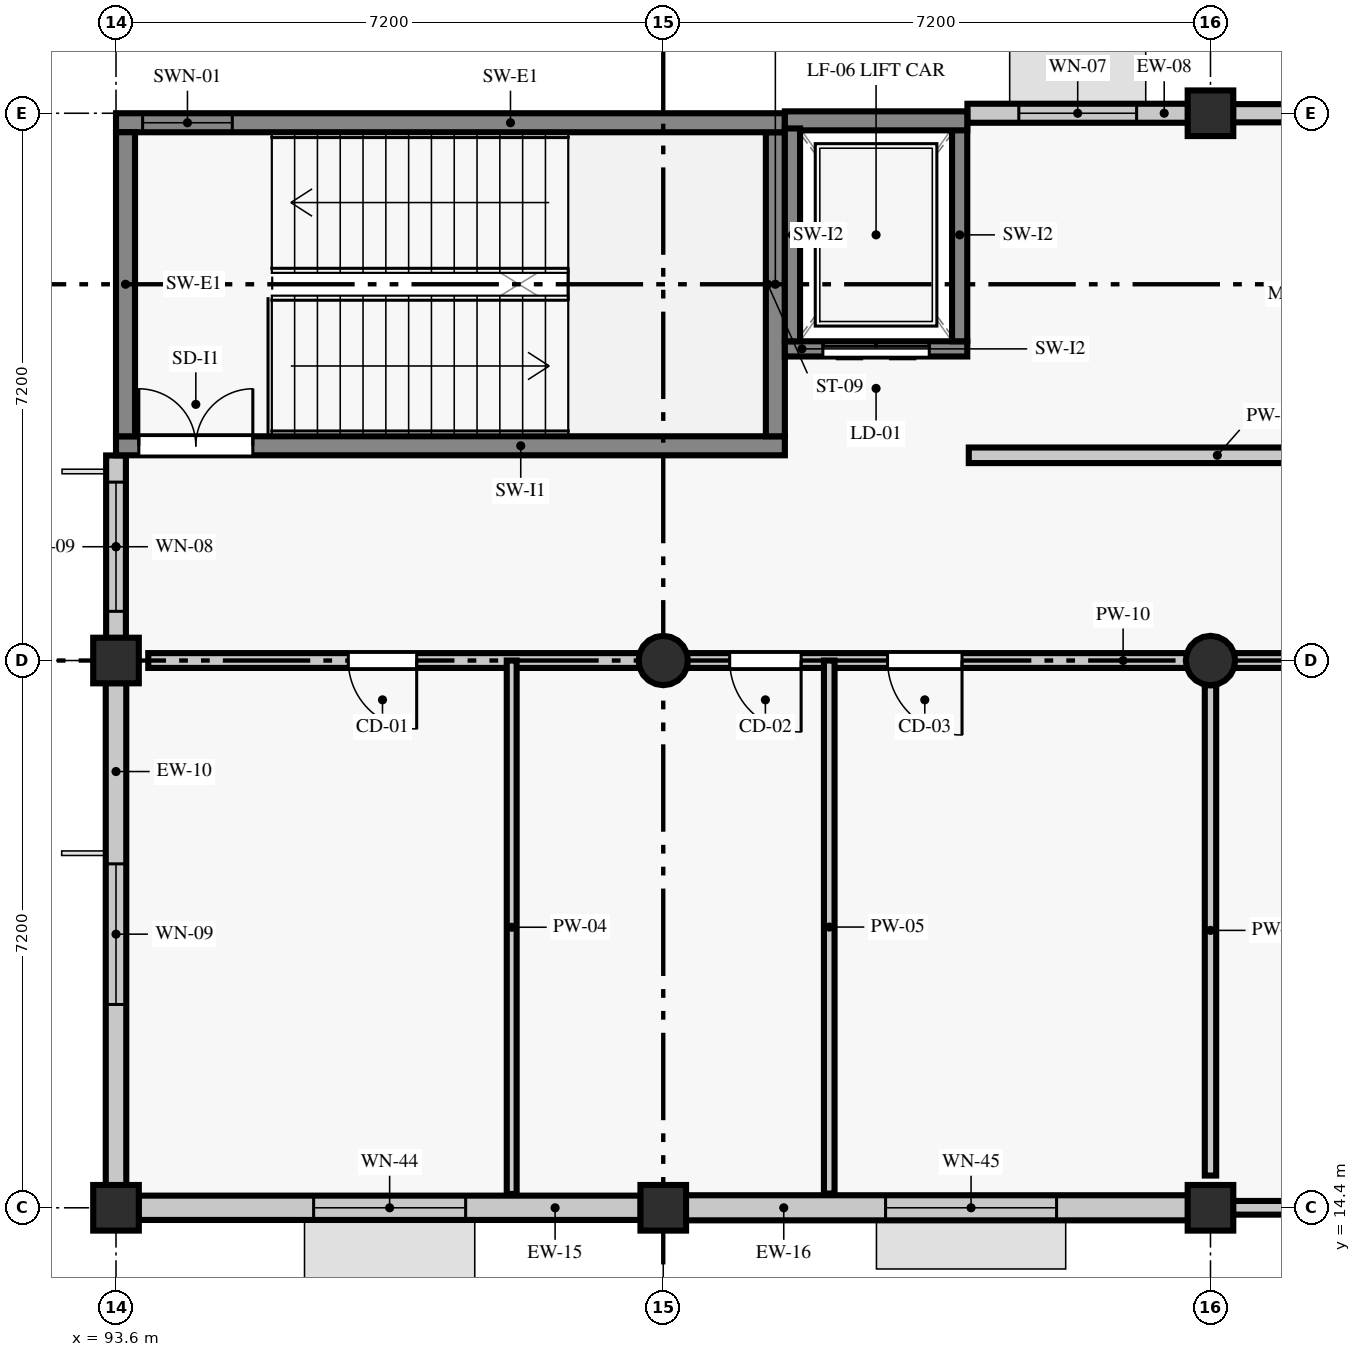
"""IFC4 building model, lengths in metres.
Left out: names, types, materials, properties, quantities, classifications, styles, units other than length and angle.
Written with IfcOpenShell. Run it as: python <this file> out.ifc"""

import sys

from ifc_helpers import new_model, si_unit, direction, frame, frame_2d, origin, origin_2d, place, context, subcontext, project, spatial, rectangle, circle, extrude, element, fill, save


model = new_model("IFC4")
c1 = context("Model", 3, precision=1e-05, world=origin(), true_north=direction((0.0, 1.0)))
c2 = subcontext(c1, "Body", "Model", "MODEL_VIEW")
j1 = project(units=[si_unit("LENGTHUNIT", "METRE"), si_unit("PLANEANGLEUNIT", "RADIAN")], contexts=[c1])
p1 = place(None, origin())
s1 = spatial("IfcSite", under=j1, at=p1, CompositionType="ELEMENT")
p2 = place(p1, origin())
s2 = spatial("IfcBuilding", under=s1, at=p2, CompositionType="ELEMENT")
p3 = place(p2, frame((0.0, 0.0, 9.6)))
s3 = spatial("IfcBuildingStorey", under=s2, at=p3, CompositionType="ELEMENT", Elevation=9.6)
for number, where, z_axis, x_axis in (
    (1, (93.6, 14.4, 0.0), (0.0, 0.0, 1.0), (1.0, 0.0, 0.0)),
    (2, (93.6, 21.6, 0.0), (0.0, 0.0, 1.0), (1.0, 0.0, 0.0)),
    (3, (100.8, 14.4, 0.0), (0.0, 0.0, 1.0), (1.0, 0.0, 0.0)),
):
    element("IfcColumn", number, at=place(p3, frame(where, z_axis=z_axis, x_axis=x_axis)), inside=s3, PredefinedType="COLUMN", context=c2, shape_type="SweptSolid", body=[
        extrude(rectangle(XDim=0.6, YDim=0.6, at=origin_2d()), origin(), (0.0, 0.0, 1.0), 3.885),
    ])
p4 = place(p3, frame((100.8, 21.6, 0.0), z_axis=(0.0, 0.0, 1.0), x_axis=(1.0, 0.0, 0.0)))
e4 = element("IfcColumn", 4, at=p4, inside=s3, PredefinedType="COLUMN", context=c2, shape_type="SweptSolid", body=[
    extrude(circle(Radius=0.325, at=origin_2d()), origin(), (0.0, 0.0, 1.0), 3.885),
])
p5 = place(p3, frame((108.0, 14.4, 0.0), z_axis=(0.0, 0.0, 1.0), x_axis=(1.0, 0.0, 0.0)))
e5 = element("IfcColumn", 5, at=p5, inside=s3, PredefinedType="COLUMN", context=c2, shape_type="SweptSolid", body=[
    extrude(rectangle(XDim=0.6, YDim=0.6, at=origin_2d()), origin(), (0.0, 0.0, 1.0), 3.885),
])
p6 = place(p3, frame((108.0, 21.6, 0.0), z_axis=(0.0, 0.0, 1.0), x_axis=(1.0, 0.0, 0.0)))
e6 = element("IfcColumn", 6, at=p6, inside=s3, PredefinedType="COLUMN", context=c2, shape_type="SweptSolid", body=[
    extrude(circle(Radius=0.325, at=origin_2d()), origin(), (0.0, 0.0, 1.0), 3.885),
])
p7 = place(p3, frame((108.0, 28.8, 0.0), z_axis=(0.0, 0.0, 1.0), x_axis=(1.0, 0.0, 0.0)))
e7 = element("IfcColumn", 7, at=p7, inside=s3, PredefinedType="COLUMN", context=c2, shape_type="SweptSolid", body=[
    extrude(rectangle(XDim=0.6, YDim=0.6, at=origin_2d()), origin(), (0.0, 0.0, 1.0), 3.885),
])
p8 = place(p3, frame((93.896, 14.4, 0.0), z_axis=(0.0, 0.0, 1.0), x_axis=(1.0, 0.0, 0.0)))
e8 = element("IfcWall", 8, at=p8, inside=s3, PredefinedType="STANDARD", context=c2, shape_type="SweptSolid", body=[
    extrude(rectangle(XDim=6.608, YDim=0.32, at=frame_2d((3.304, 0.0))), origin(), (0.0, 0.0, 1.0), 3.235),
])
p9 = place(p8, frame((2.304, 0.0, 0.9)))
e9 = element("IfcOpeningElement", 9, at=p9, cuts=e8, PredefinedType="OPENING", context=c2, shape_type="SweptSolid", body=[
    extrude(rectangle(XDim=2.0, YDim=1.78, at=frame_2d((1.0, 0.89))), frame((0.0, 0.17, 0.0), z_axis=(0.0, -1.0, 0.0), x_axis=(1.0, 0.0, 0.0)), (0.0, 0.0, 1.0), 0.34),
])
p10 = place(p3, frame((101.096, 14.4, 0.0), z_axis=(0.0, 0.0, 1.0), x_axis=(1.0, 0.0, 0.0)))
e10 = element("IfcWall", 10, at=p10, inside=s3, PredefinedType="STANDARD", context=c2, shape_type="SweptSolid", body=[
    extrude(rectangle(XDim=6.608, YDim=0.33, at=frame_2d((3.304, 0.0))), origin(), (0.0, 0.0, 1.0), 3.235),
])
p11 = place(p10, frame((2.629, 0.0, 0.9)))
e11 = element("IfcOpeningElement", 11, at=p11, cuts=e10, PredefinedType="OPENING", context=c2, shape_type="SweptSolid", body=[
    extrude(rectangle(XDim=2.25, YDim=1.78, at=frame_2d((1.125, 0.89))), frame((0.0, 0.175, 0.0), z_axis=(0.0, -1.0, 0.0), x_axis=(1.0, 0.0, 0.0)), (0.0, 0.0, 1.0), 0.35),
])
p12 = place(p3, frame((108.296, 14.4, 0.0), z_axis=(0.0, 0.0, 1.0), x_axis=(1.0, 0.0, 0.0)))
e12 = element("IfcWall", 12, at=p12, inside=s3, PredefinedType="STANDARD", context=c2, shape_type="SweptSolid", body=[
    extrude(rectangle(XDim=6.608, YDim=0.18, at=frame_2d((3.304, 0.0))), origin(), (0.0, 0.0, 1.0), 3.235),
])
p13 = place(p12, frame((2.829, 0.0, 0.9)))
e13 = element("IfcOpeningElement", 13, at=p13, cuts=e12, PredefinedType="OPENING", context=c2, shape_type="SweptSolid", body=[
    extrude(rectangle(XDim=0.95, YDim=1.3, at=frame_2d((0.475, 0.65))), frame((0.0, 0.1, 0.0), z_axis=(0.0, -1.0, 0.0), x_axis=(1.0, 0.0, 0.0)), (0.0, 0.0, 1.0), 0.2),
])
p14 = place(p3, frame((113.598, 28.8, 0.0), z_axis=(0.0, 0.0, 1.0), x_axis=(-1.0, 0.0, 0.0)))
e14 = element("IfcWall", 14, at=p14, inside=s3, PredefinedType="STANDARD", context=c2, shape_type="SweptSolid", body=[
    extrude(rectangle(XDim=5.302, YDim=0.24, at=frame_2d((2.651, 0.0))), origin(), (0.0, 0.0, 1.0), 3.885),
])
p15 = place(p14, frame((1.926, 0.0, 0.9)))
e15 = element("IfcOpeningElement", 15, at=p15, cuts=e14, PredefinedType="OPENING", context=c2, shape_type="SweptSolid", body=[
    extrude(rectangle(XDim=1.45, YDim=1.3, at=frame_2d((0.725, 0.65))), frame((0.0, 0.13, 0.0), z_axis=(0.0, -1.0, 0.0), x_axis=(1.0, 0.0, 0.0)), (0.0, 0.0, 1.0), 0.26),
])
p16 = place(p3, frame((107.704, 28.8, 0.0), z_axis=(0.0, 0.0, 1.0), x_axis=(-1.0, 0.0, 0.0)))
e16 = element("IfcWall", 16, at=p16, inside=s3, PredefinedType="STANDARD", context=c2, shape_type="SweptSolid", body=[
    extrude(rectangle(XDim=2.902, YDim=0.25, at=frame_2d((1.451, 0.0))), origin(), (0.0, 0.0, 1.0), 3.885),
])
p17 = place(p16, frame((0.676, 0.0, 0.9)))
e17 = element("IfcOpeningElement", 17, at=p17, cuts=e16, PredefinedType="OPENING", context=c2, shape_type="SweptSolid", body=[
    extrude(rectangle(XDim=1.55, YDim=1.3, at=frame_2d((0.775, 0.65))), frame((0.0, 0.135, 0.0), z_axis=(0.0, -1.0, 0.0), x_axis=(1.0, 0.0, 0.0)), (0.0, 0.0, 1.0), 0.27),
])
p18 = place(p3, frame((93.6, 24.298, 0.0), z_axis=(0.0, 0.0, 1.0), x_axis=(0.0, -1.0, 0.0)))
e18 = element("IfcWall", 18, at=p18, inside=s3, PredefinedType="STANDARD", context=c2, shape_type="SweptSolid", body=[
    extrude(rectangle(XDim=2.402, YDim=0.26, at=frame_2d((1.201, 0.0))), origin(), (0.0, 0.0, 1.0), 3.885),
])
p19 = place(p18, frame((0.351, 0.0, 0.9)))
e19 = element("IfcOpeningElement", 19, at=p19, cuts=e18, PredefinedType="OPENING", context=c2, shape_type="SweptSolid", body=[
    extrude(rectangle(XDim=1.7, YDim=1.3, at=frame_2d((0.85, 0.65))), frame((0.0, 0.14, 0.0), z_axis=(0.0, -1.0, 0.0), x_axis=(1.0, 0.0, 0.0)), (0.0, 0.0, 1.0), 0.28),
])
p20 = place(p3, frame((93.6, 21.304, 0.0), z_axis=(0.0, 0.0, 1.0), x_axis=(0.0, -1.0, 0.0)))
e20 = element("IfcWall", 20, at=p20, inside=s3, PredefinedType="STANDARD", context=c2, shape_type="SweptSolid", body=[
    extrude(rectangle(XDim=6.608, YDim=0.27, at=frame_2d((3.304, 0.0))), origin(), (0.0, 0.0, 1.0), 3.235),
])
p21 = place(p20, frame((2.379, 0.0, 0.9)))
e21 = element("IfcOpeningElement", 21, at=p21, cuts=e20, PredefinedType="OPENING", context=c2, shape_type="SweptSolid", body=[
    extrude(rectangle(XDim=1.85, YDim=1.3, at=frame_2d((0.925, 0.65))), frame((0.0, 0.145, 0.0), z_axis=(0.0, -1.0, 0.0), x_axis=(1.0, 0.0, 0.0)), (0.0, 0.0, 1.0), 0.29),
])
p22 = place(p3, frame((93.6, 24.425, 0.0), z_axis=(0.0, 0.0, 1.0), x_axis=(1.0, 0.0, 0.0)))
e22 = element("IfcWall", 22, at=p22, inside=s3, PredefinedType="SHEAR", context=c2, shape_type="SweptSolid", body=[
    extrude(rectangle(XDim=8.8, YDim=0.25, at=frame_2d((4.4, 0.0))), origin(), (0.0, 0.0, 1.0), 3.885),
])
p23 = place(p22, frame((0.3, 0.0, 0.0)))
e23 = element("IfcOpeningElement", 23, at=p23, cuts=e22, PredefinedType="OPENING", context=c2, shape_type="SweptSolid", body=[
    extrude(rectangle(XDim=1.5, YDim=2.15, at=frame_2d((0.75, 1.075))), frame((0.0, 0.135, 0.0), z_axis=(0.0, -1.0, 0.0), x_axis=(1.0, 0.0, 0.0)), (0.0, 0.0, 1.0), 0.27),
])
p24 = place(p3, frame((102.275, 24.55, 0.0), z_axis=(0.0, 0.0, 1.0), x_axis=(0.0, 1.0, 0.0)))
e24 = element("IfcWall", 24, at=p24, inside=s3, PredefinedType="SHEAR", context=c2, shape_type="SweptSolid", body=[
    extrude(rectangle(XDim=4.0, YDim=0.25, at=frame_2d((2.0, 0.0))), origin(), (0.0, 0.0, 1.0), 3.885),
])
p25 = place(p3, frame((102.4, 28.675, 0.0), z_axis=(0.0, 0.0, 1.0), x_axis=(-1.0, 0.0, 0.0)))
e25 = element("IfcWall", 25, at=p25, inside=s3, PredefinedType="SHEAR", context=c2, shape_type="SweptSolid", body=[
    extrude(rectangle(XDim=8.8, YDim=0.25, at=frame_2d((4.4, 0.0))), origin(), (0.0, 0.0, 1.0), 3.885),
])
p26 = place(p25, frame((7.27, 0.0, 0.92)))
e26 = element("IfcOpeningElement", 26, at=p26, cuts=e25, PredefinedType="OPENING", context=c2, shape_type="SweptSolid", body=[
    extrude(rectangle(XDim=1.18, YDim=1.48, at=frame_2d((0.59, 0.74))), frame((0.0, 0.135, 0.0), z_axis=(0.0, -1.0, 0.0), x_axis=(1.0, 0.0, 0.0)), (0.0, 0.0, 1.0), 0.27),
])
p27 = place(p3, frame((93.725, 28.55, 0.0), z_axis=(0.0, 0.0, 1.0), x_axis=(0.0, -1.0, 0.0)))
e27 = element("IfcWall", 27, at=p27, inside=s3, PredefinedType="SHEAR", context=c2, shape_type="SweptSolid", body=[
    extrude(rectangle(XDim=4.0, YDim=0.25, at=frame_2d((2.0, 0.0))), origin(), (0.0, 0.0, 1.0), 3.885),
])
p28 = place(p3, frame((102.4, 25.7, 0.0), z_axis=(0.0, 0.0, 1.0), x_axis=(1.0, 0.0, 0.0)))
e28 = element("IfcWall", 28, at=p28, inside=s3, PredefinedType="SHEAR", context=c2, shape_type="SweptSolid", body=[
    extrude(rectangle(XDim=2.4, YDim=0.2, at=frame_2d((1.2, 0.0))), origin(), (0.0, 0.0, 1.0), 3.885),
])
p29 = place(p28, frame((0.5, 0.0, 0.0)))
e29 = element("IfcOpeningElement", 29, at=p29, cuts=e28, PredefinedType="OPENING", context=c2, shape_type="SweptSolid", body=[
    extrude(rectangle(XDim=1.4, YDim=2.15, at=frame_2d((0.7, 1.075))), frame((0.0, 0.11, 0.0), z_axis=(0.0, -1.0, 0.0), x_axis=(1.0, 0.0, 0.0)), (0.0, 0.0, 1.0), 0.22),
])
p30 = place(p3, frame((104.7, 25.8, 0.0), z_axis=(0.0, 0.0, 1.0), x_axis=(0.0, 1.0, 0.0)))
e30 = element("IfcWall", 30, at=p30, inside=s3, PredefinedType="SHEAR", context=c2, shape_type="SweptSolid", body=[
    extrude(rectangle(XDim=2.8, YDim=0.2, at=frame_2d((1.4, 0.0))), origin(), (0.0, 0.0, 1.0), 3.885),
])
p31 = place(p3, frame((104.8, 28.7, 0.0), z_axis=(0.0, 0.0, 1.0), x_axis=(-1.0, 0.0, 0.0)))
e31 = element("IfcWall", 31, at=p31, inside=s3, PredefinedType="SHEAR", context=c2, shape_type="SweptSolid", body=[
    extrude(rectangle(XDim=2.4, YDim=0.25, at=frame_2d((1.2, 0.0))), origin(), (0.0, 0.0, 1.0), 3.885),
])
p32 = place(p3, frame((102.5, 28.6, 0.0), z_axis=(0.0, 0.0, 1.0), x_axis=(0.0, -1.0, 0.0)))
e32 = element("IfcWall", 32, at=p32, inside=s3, PredefinedType="SHEAR", context=c2, shape_type="SweptSolid", body=[
    extrude(rectangle(XDim=2.8, YDim=0.2, at=frame_2d((1.4, 0.0))), origin(), (0.0, 0.0, 1.0), 3.885),
])
p33 = place(p3, frame((94.024, 21.6, 0.0), z_axis=(0.0, 0.0, 1.0), x_axis=(1.0, 0.0, 0.0)))
e33 = element("IfcWall", 33, at=p33, inside=s3, PredefinedType="PARTITIONING", context=c2, shape_type="SweptSolid", body=[
    extrude(rectangle(XDim=27.951, YDim=0.195, at=frame_2d((13.976, 0.0))), origin(), (0.0, 0.0, 1.0), 3.185),
])
p34 = place(p33, frame((2.632, 0.0, 0.0)))
e34 = element("IfcOpeningElement", 34, at=p34, cuts=e33, PredefinedType="OPENING", context=c2, shape_type="SweptSolid", body=[
    extrude(rectangle(XDim=0.9, YDim=2.08, at=frame_2d((0.45, 1.04))), frame((0.0, 0.107, 0.0), z_axis=(0.0, -1.0, 0.0), x_axis=(1.0, 0.0, 0.0)), (0.0, 0.0, 1.0), 0.215),
])
p35 = place(p33, frame((7.65, 0.0, 0.0)))
e35 = element("IfcOpeningElement", 35, at=p35, cuts=e33, PredefinedType="OPENING", context=c2, shape_type="SweptSolid", body=[
    extrude(rectangle(XDim=0.94, YDim=2.08, at=frame_2d((0.47, 1.04))), frame((0.0, 0.107, 0.0), z_axis=(0.0, -1.0, 0.0), x_axis=(1.0, 0.0, 0.0)), (0.0, 0.0, 1.0), 0.215),
])
p36 = place(p33, frame((9.727, 0.0, 0.0)))
e36 = element("IfcOpeningElement", 36, at=p36, cuts=e33, PredefinedType="OPENING", context=c2, shape_type="SweptSolid", body=[
    extrude(rectangle(XDim=0.98, YDim=2.08, at=frame_2d((0.49, 1.04))), frame((0.0, 0.107, 0.0), z_axis=(0.0, -1.0, 0.0), x_axis=(1.0, 0.0, 0.0)), (0.0, 0.0, 1.0), 0.215),
])
p37 = place(p33, frame((14.946, 0.0, 0.0)))
e37 = element("IfcOpeningElement", 37, at=p37, cuts=e33, PredefinedType="OPENING", context=c2, shape_type="SweptSolid", body=[
    extrude(rectangle(XDim=0.94, YDim=2.08, at=frame_2d((0.47, 1.04))), frame((0.0, 0.107, 0.0), z_axis=(0.0, -1.0, 0.0), x_axis=(1.0, 0.0, 0.0)), (0.0, 0.0, 1.0), 0.215),
])
p38 = place(p33, frame((17.136, 0.0, 0.0)))
e38 = element("IfcOpeningElement", 38, at=p38, cuts=e33, PredefinedType="OPENING", context=c2, shape_type="SweptSolid", body=[
    extrude(rectangle(XDim=0.9, YDim=2.08, at=frame_2d((0.45, 1.04))), frame((0.0, 0.107, 0.0), z_axis=(0.0, -1.0, 0.0), x_axis=(1.0, 0.0, 0.0)), (0.0, 0.0, 1.0), 0.215),
])
p39 = place(p33, frame((19.366, 0.0, 0.0)))
e39 = element("IfcOpeningElement", 39, at=p39, cuts=e33, PredefinedType="OPENING", context=c2, shape_type="SweptSolid", body=[
    extrude(rectangle(XDim=0.9, YDim=2.13, at=frame_2d((0.45, 1.065))), frame((0.0, 0.107, 0.0), z_axis=(0.0, -1.0, 0.0), x_axis=(1.0, 0.0, 0.0)), (0.0, 0.0, 1.0), 0.215),
])
p40 = place(p33, frame((24.284, 0.0, 0.0)))
e40 = element("IfcOpeningElement", 40, at=p40, cuts=e33, PredefinedType="OPENING", context=c2, shape_type="SweptSolid", body=[
    extrude(rectangle(XDim=0.9, YDim=2.13, at=frame_2d((0.45, 1.065))), frame((0.0, 0.107, 0.0), z_axis=(0.0, -1.0, 0.0), x_axis=(1.0, 0.0, 0.0)), (0.0, 0.0, 1.0), 0.215),
])
p41 = place(p3, frame((98.806, 14.582, 0.0), z_axis=(0.0, 0.0, 1.0), x_axis=(0.0, 1.0, 0.0)))
e41 = element("IfcWall", 41, at=p41, inside=s3, PredefinedType="PARTITIONING", context=c2, shape_type="SweptSolid", body=[
    extrude(rectangle(XDim=7.018, YDim=0.13, at=frame_2d((3.509, 0.0))), origin(), (0.0, 0.0, 1.0), 3.185),
])
p42 = place(p3, frame((102.984, 14.587, 0.0), z_axis=(0.0, 0.0, 1.0), x_axis=(0.0, 1.0, 0.0)))
e42 = element("IfcWall", 42, at=p42, inside=s3, PredefinedType="PARTITIONING", context=c2, shape_type="SweptSolid", body=[
    extrude(rectangle(XDim=7.013, YDim=0.14, at=frame_2d((3.507, 0.0))), origin(), (0.0, 0.0, 1.0), 3.185),
])
p43 = place(p3, frame((108.0, 14.824, 0.0), z_axis=(0.0, 0.0, 1.0), x_axis=(0.0, 1.0, 0.0)))
e43 = element("IfcWall", 43, at=p43, inside=s3, PredefinedType="PARTITIONING", context=c2, shape_type="SweptSolid", body=[
    extrude(rectangle(XDim=6.451, YDim=0.15, at=frame_2d((3.225, 0.0))), origin(), (0.0, 0.0, 1.0), 3.335),
])
p44 = place(p3, frame((104.82, 24.3, 0.0), z_axis=(0.0, 0.0, 1.0), x_axis=(1.0, 0.0, 0.0)))
e44 = element("IfcWall", 44, at=p44, inside=s3, PredefinedType="PARTITIONING", context=c2, shape_type="SweptSolid", body=[
    extrude(rectangle(XDim=8.76, YDim=0.205, at=frame_2d((4.38, 0.0))), origin(), (0.0, 0.0, 1.0), 3.335),
])
p45 = place(p44, frame((6.59, 0.0, 0.0)))
e45 = element("IfcOpeningElement", 45, at=p45, cuts=e44, PredefinedType="OPENING", context=c2, shape_type="SweptSolid", body=[
    extrude(rectangle(XDim=0.95, YDim=2.13, at=frame_2d((0.475, 1.065))), frame((0.0, 0.113, 0.0), z_axis=(0.0, -1.0, 0.0), x_axis=(1.0, 0.0, 0.0)), (0.0, 0.0, 1.0), 0.225),
])
p46 = place(p9, origin())
e46 = element("IfcWindow", 46, at=p46, inside=s3, PartitioningType="SINGLE_PANEL", PredefinedType="WINDOW", context=c2, shape_type="SweptSolid", body=[
    extrude(rectangle(XDim=2.0, YDim=1.78, at=frame_2d((1.0, 0.89))), frame((0.0, 0.03, 0.0), z_axis=(0.0, -1.0, 0.0), x_axis=(1.0, 0.0, 0.0)), (0.0, 0.0, 1.0), 0.06),
])
fill(e9, e46)
p47 = place(p11, origin())
e47 = element("IfcWindow", 47, at=p47, inside=s3, PartitioningType="SINGLE_PANEL", PredefinedType="WINDOW", context=c2, shape_type="SweptSolid", body=[
    extrude(rectangle(XDim=2.25, YDim=1.78, at=frame_2d((1.125, 0.89))), frame((0.0, 0.03, 0.0), z_axis=(0.0, -1.0, 0.0), x_axis=(1.0, 0.0, 0.0)), (0.0, 0.0, 1.0), 0.06),
])
fill(e11, e47)
p48 = place(p17, origin())
e48 = element("IfcWindow", 48, at=p48, inside=s3, PartitioningType="SINGLE_PANEL", PredefinedType="WINDOW", context=c2, shape_type="SweptSolid", body=[
    extrude(rectangle(XDim=1.55, YDim=1.3, at=frame_2d((0.775, 0.65))), frame((0.0, 0.03, 0.0), z_axis=(0.0, -1.0, 0.0), x_axis=(1.0, 0.0, 0.0)), (0.0, 0.0, 1.0), 0.06),
])
fill(e17, e48)
p49 = place(p19, origin())
e49 = element("IfcWindow", 49, at=p49, inside=s3, PartitioningType="SINGLE_PANEL", PredefinedType="WINDOW", context=c2, shape_type="SweptSolid", body=[
    extrude(rectangle(XDim=1.7, YDim=1.3, at=frame_2d((0.85, 0.65))), frame((0.0, 0.03, 0.0), z_axis=(0.0, -1.0, 0.0), x_axis=(1.0, 0.0, 0.0)), (0.0, 0.0, 1.0), 0.06),
])
fill(e19, e49)
p50 = place(p21, origin())
e50 = element("IfcWindow", 50, at=p50, inside=s3, PartitioningType="SINGLE_PANEL", PredefinedType="WINDOW", context=c2, shape_type="SweptSolid", body=[
    extrude(rectangle(XDim=1.85, YDim=1.3, at=frame_2d((0.925, 0.65))), frame((0.0, 0.03, 0.0), z_axis=(0.0, -1.0, 0.0), x_axis=(1.0, 0.0, 0.0)), (0.0, 0.0, 1.0), 0.06),
])
fill(e21, e50)
p51 = place(p23, origin())
e51 = element("IfcDoor", 51, at=p51, inside=s3, OperationType="DOUBLE_DOOR_SINGLE_SWING", PredefinedType="DOOR", context=c2, shape_type="SweptSolid", body=[
    extrude(rectangle(XDim=1.5, YDim=2.15, at=frame_2d((0.75, 1.075))), frame((0.0, 0.025, 0.0), z_axis=(0.0, -1.0, 0.0), x_axis=(1.0, 0.0, 0.0)), (0.0, 0.0, 1.0), 0.05),
])
fill(e23, e51)
p52 = place(p26, origin())
e52 = element("IfcWindow", 52, at=p52, inside=s3, PartitioningType="SINGLE_PANEL", PredefinedType="WINDOW", context=c2, shape_type="SweptSolid", body=[
    extrude(rectangle(XDim=1.18, YDim=1.48, at=frame_2d((0.59, 0.74))), frame((0.0, 0.03, 0.0), z_axis=(0.0, -1.0, 0.0), x_axis=(1.0, 0.0, 0.0)), (0.0, 0.0, 1.0), 0.06),
])
fill(e26, e52)
p53 = place(p29, frame((1.4, 0.0, 0.0), z_axis=(0.0, 0.0, 1.0), x_axis=(-1.0, 0.0, 0.0)))
e53 = element("IfcDoor", 53, at=p53, inside=s3, OperationType="DOUBLE_DOOR_SLIDING", PredefinedType="DOOR", context=c2, shape_type="SweptSolid", body=[
    extrude(rectangle(XDim=1.4, YDim=2.15, at=frame_2d((0.7, 1.075))), frame((0.0, 0.025, 0.0), z_axis=(0.0, -1.0, 0.0), x_axis=(1.0, 0.0, 0.0)), (0.0, 0.0, 1.0), 0.05),
])
fill(e29, e53)
p54 = place(p34, frame((0.9, 0.0, 0.0), z_axis=(0.0, 0.0, 1.0), x_axis=(-1.0, 0.0, 0.0)))
e54 = element("IfcDoor", 54, at=p54, inside=s3, OperationType="SINGLE_SWING_LEFT", PredefinedType="DOOR", context=c2, shape_type="SweptSolid", body=[
    extrude(rectangle(XDim=0.9, YDim=2.08, at=frame_2d((0.45, 1.04))), frame((0.0, 0.025, 0.0), z_axis=(0.0, -1.0, 0.0), x_axis=(1.0, 0.0, 0.0)), (0.0, 0.0, 1.0), 0.05),
])
fill(e34, e54)
p55 = place(p35, frame((0.94, 0.0, 0.0), z_axis=(0.0, 0.0, 1.0), x_axis=(-1.0, 0.0, 0.0)))
e55 = element("IfcDoor", 55, at=p55, inside=s3, OperationType="SINGLE_SWING_LEFT", PredefinedType="DOOR", context=c2, shape_type="SweptSolid", body=[
    extrude(rectangle(XDim=0.94, YDim=2.08, at=frame_2d((0.47, 1.04))), frame((0.0, 0.025, 0.0), z_axis=(0.0, -1.0, 0.0), x_axis=(1.0, 0.0, 0.0)), (0.0, 0.0, 1.0), 0.05),
])
fill(e35, e55)
p56 = place(p36, frame((0.98, 0.0, 0.0), z_axis=(0.0, 0.0, 1.0), x_axis=(-1.0, 0.0, 0.0)))
e56 = element("IfcDoor", 56, at=p56, inside=s3, OperationType="SINGLE_SWING_LEFT", PredefinedType="DOOR", context=c2, shape_type="SweptSolid", body=[
    extrude(rectangle(XDim=0.98, YDim=2.08, at=frame_2d((0.49, 1.04))), frame((0.0, 0.025, 0.0), z_axis=(0.0, -1.0, 0.0), x_axis=(1.0, 0.0, 0.0)), (0.0, 0.0, 1.0), 0.05),
])
fill(e36, e56)
save(model, sys.argv[1])
